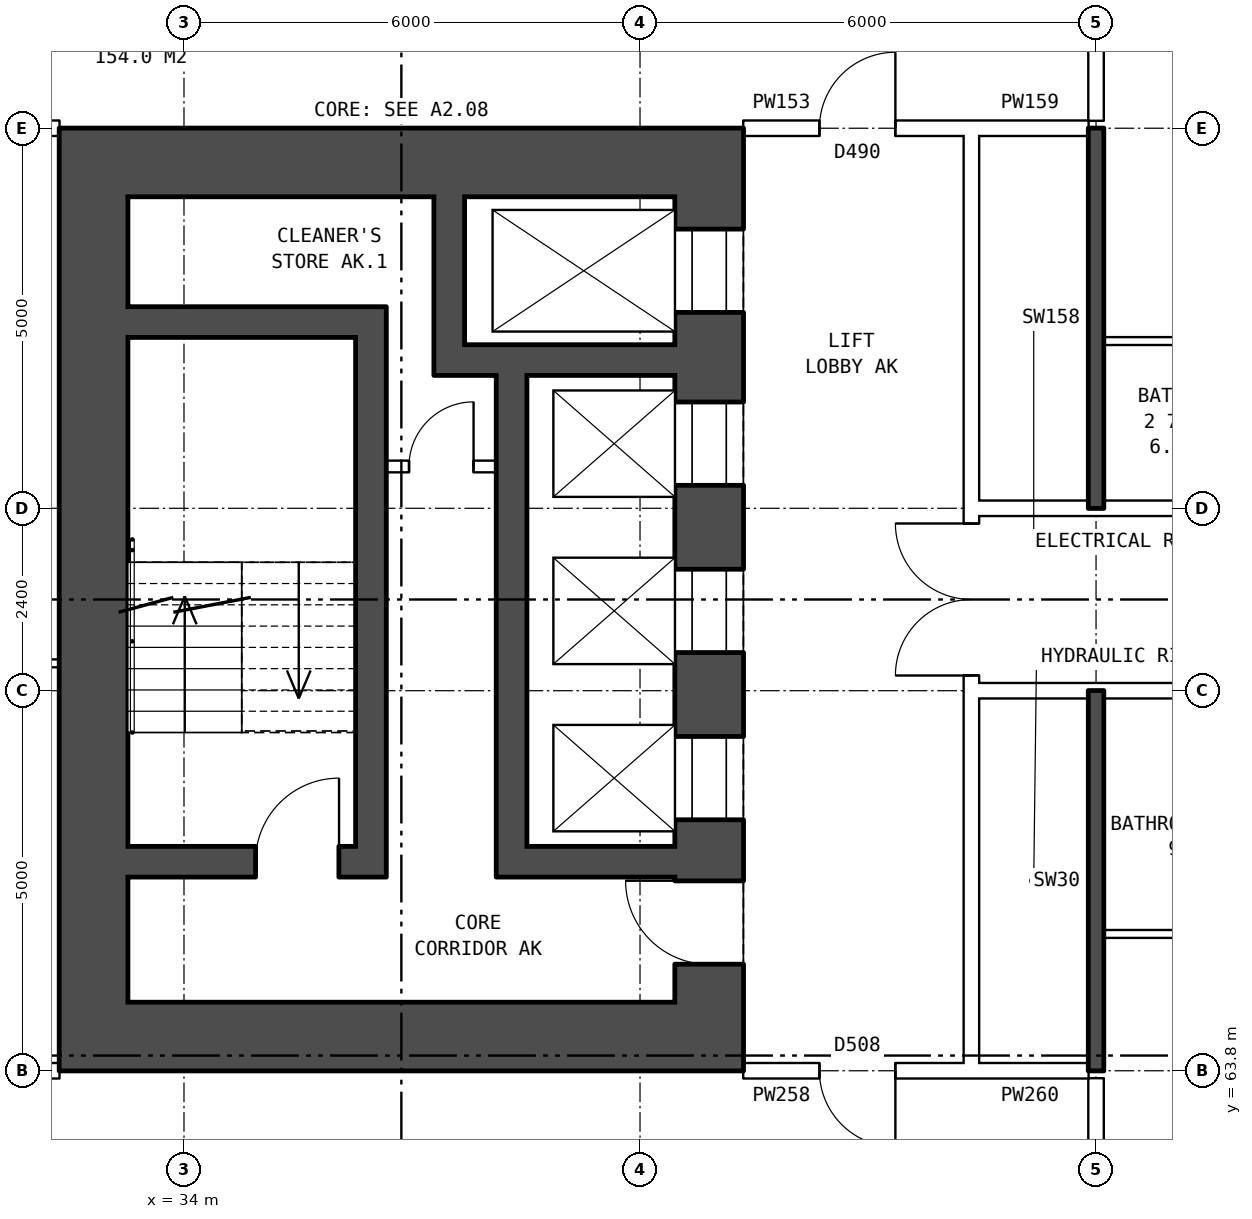
"""IFC4 building model, lengths in metres.
Left out: names, types, materials, properties, quantities, classifications, styles, units other than length and angle.
Written with IfcOpenShell. Run it as: python <this file> out.ifc"""

import sys

from ifc_helpers import new_model, si_unit, direction, frame, frame_2d, origin, place, context, subcontext, project, spatial, rectangle, extrude, element, fill, save


model = new_model("IFC4")
c1 = context("Model", 3, precision=1e-05, world=origin(), true_north=direction((0.0, 1.0)))
c2 = subcontext(c1, "Body", "Model", "MODEL_VIEW")
j1 = project(units=[si_unit("LENGTHUNIT", "METRE"), si_unit("PLANEANGLEUNIT", "RADIAN")], contexts=[c1])
p1 = place(None, origin())
s1 = spatial("IfcSite", under=j1, at=p1, CompositionType="ELEMENT")
p2 = place(p1, origin())
s2 = spatial("IfcBuilding", under=s1, at=p2, CompositionType="ELEMENT")
p3 = place(p2, frame((0.0, 0.0, 28.8)))
s3 = spatial("IfcBuildingStorey", under=s2, at=p3, CompositionType="ELEMENT", Elevation=28.8)
p4 = place(p3, frame((40.91, 75.3, 0.0), z_axis=(0.0, 0.0, 1.0), x_axis=(0.0, -1.0, 0.0)))
e1 = element("IfcWall", 1, at=p4, inside=s3, PredefinedType="SHEAR", context=c2, shape_type="SweptSolid", body=[
    extrude(rectangle(XDim=10.6, YDim=0.9, at=frame_2d((5.3, 0.0))), origin(), (0.0, 0.0, 1.0), 2.85),
])
p5 = place(p4, frame((0.425, 0.0, 0.0)))
e2 = element("IfcOpeningElement", 2, at=p5, cuts=e1, PredefinedType="OPENING", context=c2, shape_type="SweptSolid", body=[
    extrude(rectangle(XDim=1.1, YDim=2.1, at=frame_2d((0.55, 1.05))), frame((0.0, 0.46, 0.0), z_axis=(0.0, -1.0, 0.0), x_axis=(1.0, 0.0, 0.0)), (0.0, 0.0, 1.0), 0.92),
])
p6 = place(p4, frame((2.7, 0.0, 0.0)))
e3 = element("IfcOpeningElement", 3, at=p6, cuts=e1, PredefinedType="OPENING", context=c2, shape_type="SweptSolid", body=[
    extrude(rectangle(XDim=1.1, YDim=2.1, at=frame_2d((0.55, 1.05))), frame((0.0, 0.46, 0.0), z_axis=(0.0, -1.0, 0.0), x_axis=(1.0, 0.0, 0.0)), (0.0, 0.0, 1.0), 0.92),
])
p7 = place(p4, frame((4.9, 0.0, 0.0)))
e4 = element("IfcOpeningElement", 4, at=p7, cuts=e1, PredefinedType="OPENING", context=c2, shape_type="SweptSolid", body=[
    extrude(rectangle(XDim=1.1, YDim=2.1, at=frame_2d((0.55, 1.05))), frame((0.0, 0.46, 0.0), z_axis=(0.0, -1.0, 0.0), x_axis=(1.0, 0.0, 0.0)), (0.0, 0.0, 1.0), 0.92),
])
p8 = place(p4, frame((7.1, 0.0, 0.0)))
e5 = element("IfcOpeningElement", 5, at=p8, cuts=e1, PredefinedType="OPENING", context=c2, shape_type="SweptSolid", body=[
    extrude(rectangle(XDim=1.1, YDim=2.1, at=frame_2d((0.55, 1.05))), frame((0.0, 0.46, 0.0), z_axis=(0.0, -1.0, 0.0), x_axis=(1.0, 0.0, 0.0)), (0.0, 0.0, 1.0), 0.92),
])
p9 = place(p4, frame((9.0, 0.0, 0.0)))
e6 = element("IfcOpeningElement", 6, at=p9, cuts=e1, PredefinedType="OPENING", context=c2, shape_type="SweptSolid", body=[
    extrude(rectangle(XDim=1.1, YDim=2.1, at=frame_2d((0.55, 1.05))), frame((0.0, 0.46, 0.0), z_axis=(0.0, -1.0, 0.0), x_axis=(1.0, 0.0, 0.0)), (0.0, 0.0, 1.0), 0.92),
])
p10 = place(p3, frame((32.81, 75.3, 0.0), z_axis=(0.0, 0.0, 1.0), x_axis=(0.0, -1.0, 0.0)))
e7 = element("IfcWall", 7, at=p10, inside=s3, PredefinedType="SHEAR", context=c2, shape_type="SweptSolid", body=[
    extrude(rectangle(XDim=10.6, YDim=0.9, at=frame_2d((5.3, 0.0))), origin(), (0.0, 0.0, 1.0), 2.85),
])
for number, where, z_axis, x_axis in (
    (8, (41.36, 75.75, 0.0), (0.0, 0.0, 1.0), (-1.0, 0.0, 0.0)),
    (9, (41.36, 64.25, 0.0), (0.0, 0.0, 1.0), (-1.0, 0.0, 0.0)),
):
    element("IfcWall", number, at=place(p3, frame(where, z_axis=z_axis, x_axis=x_axis)), inside=s3, PredefinedType="SHEAR", context=c2, shape_type="SweptSolid", body=[
        extrude(rectangle(XDim=9.0, YDim=0.9, at=frame_2d((4.5, 0.0))), origin(), (0.0, 0.0, 1.0), 2.85),
    ])
p11 = place(p3, frame((36.26, 73.65, 0.0), z_axis=(0.0, 0.0, 1.0), x_axis=(-1.0, 0.0, 0.0)))
e10 = element("IfcWall", 10, at=p11, inside=s3, PredefinedType="SHEAR", context=c2, shape_type="SweptSolid", body=[
    extrude(rectangle(XDim=3.0, YDim=0.4, at=frame_2d((1.5, 0.0))), origin(), (0.0, 0.0, 1.0), 2.85),
])
p12 = place(p3, frame((40.46, 73.15, 0.0), z_axis=(0.0, 0.0, 1.0), x_axis=(-1.0, 0.0, 0.0)))
e11 = element("IfcWall", 11, at=p12, inside=s3, PredefinedType="SHEAR", context=c2, shape_type="SweptSolid", body=[
    extrude(rectangle(XDim=3.17, YDim=0.4, at=frame_2d((1.585, 0.0))), origin(), (0.0, 0.0, 1.0), 2.85),
])
p13 = place(p3, frame((38.11, 71.75, 0.0), z_axis=(0.0, 0.0, 1.0), x_axis=(-1.0, 0.0, 0.0)))
e12 = element("IfcWall", 12, at=p13, inside=s3, PredefinedType="PARTITIONING", context=c2, shape_type="SweptSolid", body=[
    extrude(rectangle(XDim=1.45, YDim=0.15, at=frame_2d((0.725, 0.0))), origin(), (0.0, 0.0, 1.0), 2.85),
])
p14 = place(p13, frame((0.3, 0.0, 0.0)))
e13 = element("IfcOpeningElement", 13, at=p14, cuts=e12, PredefinedType="OPENING", context=c2, shape_type="SweptSolid", body=[
    extrude(rectangle(XDim=0.85, YDim=2.1, at=frame_2d((0.425, 1.05))), frame((0.0, 0.085, 0.0), z_axis=(0.0, -1.0, 0.0), x_axis=(1.0, 0.0, 0.0)), (0.0, 0.0, 1.0), 0.17),
])
p15 = place(p3, frame((40.46, 66.55, 0.0), z_axis=(0.0, 0.0, 1.0), x_axis=(-1.0, 0.0, 0.0)))
e14 = element("IfcWall", 14, at=p15, inside=s3, PredefinedType="SHEAR", context=c2, shape_type="SweptSolid", body=[
    extrude(rectangle(XDim=1.95, YDim=0.4, at=frame_2d((0.975, 0.0))), origin(), (0.0, 0.0, 1.0), 2.85),
])
p16 = place(p3, frame((36.26, 66.55, 0.0), z_axis=(0.0, 0.0, 1.0), x_axis=(-1.0, 0.0, 0.0)))
e15 = element("IfcWall", 15, at=p16, inside=s3, PredefinedType="SHEAR", context=c2, shape_type="SweptSolid", body=[
    extrude(rectangle(XDim=3.0, YDim=0.4, at=frame_2d((1.5, 0.0))), origin(), (0.0, 0.0, 1.0), 2.85),
])
p17 = place(p16, frame((0.22, 0.0, 0.0)))
e16 = element("IfcOpeningElement", 16, at=p17, cuts=e15, PredefinedType="OPENING", context=c2, shape_type="SweptSolid", body=[
    extrude(rectangle(XDim=1.1, YDim=2.1, at=frame_2d((0.55, 1.05))), frame((0.0, 0.21, 0.0), z_axis=(0.0, -1.0, 0.0), x_axis=(1.0, 0.0, 0.0)), (0.0, 0.0, 1.0), 0.42),
])
p18 = place(p3, frame((38.31, 72.95, 0.0), z_axis=(0.0, 0.0, 1.0), x_axis=(0.0, -1.0, 0.0)))
e17 = element("IfcWall", 17, at=p18, inside=s3, PredefinedType="SHEAR", context=c2, shape_type="SweptSolid", body=[
    extrude(rectangle(XDim=6.6, YDim=0.4, at=frame_2d((3.3, 0.0))), origin(), (0.0, 0.0, 1.0), 2.85),
])
p19 = place(p3, frame((37.49, 75.3, 0.0), z_axis=(0.0, 0.0, 1.0), x_axis=(0.0, -1.0, 0.0)))
e18 = element("IfcWall", 18, at=p19, inside=s3, PredefinedType="SHEAR", context=c2, shape_type="SweptSolid", body=[
    extrude(rectangle(XDim=1.95, YDim=0.4, at=frame_2d((0.975, 0.0))), origin(), (0.0, 0.0, 1.0), 2.85),
])
p20 = place(p3, frame((36.46, 73.85, 0.0), z_axis=(0.0, 0.0, 1.0), x_axis=(0.0, -1.0, 0.0)))
e19 = element("IfcWall", 19, at=p20, inside=s3, PredefinedType="SHEAR", context=c2, shape_type="SweptSolid", body=[
    extrude(rectangle(XDim=7.5, YDim=0.4, at=frame_2d((3.75, 0.0))), origin(), (0.0, 0.0, 1.0), 2.85),
])
p21 = place(p3, frame((44.36, 63.9, 0.0), z_axis=(0.0, 0.0, 1.0), x_axis=(0.0, 1.0, 0.0)))
e20 = element("IfcWall", 20, at=p21, inside=s3, PredefinedType="PARTITIONING", context=c2, shape_type="SweptSolid", body=[
    extrude(rectangle(XDim=12.2, YDim=0.2, at=frame_2d((6.1, 0.0))), origin(), (0.0, 0.0, 1.0), 2.85),
])
p22 = place(p21, frame((5.1, 0.0, 0.0)))
e21 = element("IfcOpeningElement", 21, at=p22, cuts=e20, PredefinedType="OPENING", context=c2, shape_type="SweptSolid", body=[
    extrude(rectangle(XDim=2.0, YDim=2.1, at=frame_2d((1.0, 1.05))), frame((0.0, 0.11, 0.0), z_axis=(0.0, -1.0, 0.0), x_axis=(1.0, 0.0, 0.0)), (0.0, 0.0, 1.0), 0.22),
])
p23 = place(p3, frame((22.51, 63.8, 0.0), z_axis=(0.0, 0.0, 1.0), x_axis=(1.0, 0.0, 0.0)))
e22 = element("IfcWall", 22, at=p23, inside=s3, PredefinedType="PARTITIONING", context=c2, shape_type="SweptSolid", body=[
    extrude(rectangle(XDim=9.85, YDim=0.2, at=frame_2d((4.925, 0.0))), origin(), (0.0, 0.0, 1.0), 2.85),
])
p24 = place(p23, frame((7.27, 0.0, 0.0)))
e23 = element("IfcOpeningElement", 23, at=p24, cuts=e22, PredefinedType="OPENING", context=c2, shape_type="SweptSolid", body=[
    extrude(rectangle(XDim=0.8, YDim=2.1, at=frame_2d((0.4, 1.05))), frame((0.0, 0.11, 0.0), z_axis=(0.0, -1.0, 0.0), x_axis=(1.0, 0.0, 0.0)), (0.0, 0.0, 1.0), 0.22),
])
p25 = place(p3, frame((41.36, 63.8, 0.0), z_axis=(0.0, 0.0, 1.0), x_axis=(1.0, 0.0, 0.0)))
e24 = element("IfcWall", 24, at=p25, inside=s3, PredefinedType="PARTITIONING", context=c2, shape_type="SweptSolid", body=[
    extrude(rectangle(XDim=3.0, YDim=0.2, at=frame_2d((1.5, 0.0))), origin(), (0.0, 0.0, 1.0), 2.85),
])
p26 = place(p25, frame((1.0, 0.0, 0.0)))
e25 = element("IfcOpeningElement", 25, at=p26, cuts=e24, PredefinedType="OPENING", context=c2, shape_type="SweptSolid", body=[
    extrude(rectangle(XDim=1.0, YDim=2.1, at=frame_2d((0.5, 1.05))), frame((0.0, 0.11, 0.0), z_axis=(0.0, -1.0, 0.0), x_axis=(1.0, 0.0, 0.0)), (0.0, 0.0, 1.0), 0.22),
])
p27 = place(p3, frame((44.36, 63.8, 0.0), z_axis=(0.0, 0.0, 1.0), x_axis=(1.0, 0.0, 0.0)))
e26 = element("IfcWall", 26, at=p27, inside=s3, PredefinedType="PARTITIONING", context=c2, shape_type="SweptSolid", body=[
    extrude(rectangle(XDim=1.54, YDim=0.2, at=frame_2d((0.77, 0.0))), origin(), (0.0, 0.0, 1.0), 2.85),
])
p28 = place(p3, frame((46.1, 65.6, 0.0), z_axis=(0.0, 0.0, 1.0), x_axis=(1.0, 0.0, 0.0)))
e27 = element("IfcWall", 27, at=p28, inside=s3, PredefinedType="PARTITIONING", context=c2, shape_type="SweptSolid", body=[
    extrude(rectangle(XDim=2.9, YDim=0.1, at=frame_2d((1.45, 0.0))), origin(), (0.0, 0.0, 1.0), 2.85),
])
p29 = place(p3, frame((44.36, 68.8, 0.0), z_axis=(0.0, 0.0, 1.0), x_axis=(1.0, 0.0, 0.0)))
e28 = element("IfcWall", 28, at=p29, inside=s3, PredefinedType="PARTITIONING", context=c2, shape_type="SweptSolid", body=[
    extrude(rectangle(XDim=19.28, YDim=0.2, at=frame_2d((9.64, 0.0))), origin(), (0.0, 0.0, 1.0), 2.85),
])
p30 = place(p29, frame((14.64, 0.0, 0.0)))
e29 = element("IfcOpeningElement", 29, at=p30, cuts=e28, PredefinedType="OPENING", context=c2, shape_type="SweptSolid", body=[
    extrude(rectangle(XDim=1.0, YDim=2.1, at=frame_2d((0.5, 1.05))), frame((0.0, 0.11, 0.0), z_axis=(0.0, -1.0, 0.0), x_axis=(1.0, 0.0, 0.0)), (0.0, 0.0, 1.0), 0.22),
])
p31 = place(p29, frame((5.64, 0.0, 0.0)))
e30 = element("IfcOpeningElement", 30, at=p31, cuts=e28, PredefinedType="OPENING", context=c2, shape_type="SweptSolid", body=[
    extrude(rectangle(XDim=1.0, YDim=2.1, at=frame_2d((0.5, 1.05))), frame((0.0, 0.11, 0.0), z_axis=(0.0, -1.0, 0.0), x_axis=(1.0, 0.0, 0.0)), (0.0, 0.0, 1.0), 0.22),
])
p32 = place(p3, frame((28.1, 69.16, 0.0), z_axis=(0.0, 0.0, 1.0), x_axis=(1.0, 0.0, 0.0)))
e31 = element("IfcWall", 31, at=p32, inside=s3, PredefinedType="PARTITIONING", context=c2, shape_type="SweptSolid", body=[
    extrude(rectangle(XDim=4.26, YDim=0.1, at=frame_2d((2.13, 0.0))), origin(), (0.0, 0.0, 1.0), 2.85),
])
p33 = place(p3, frame((44.36, 71.2, 0.0), z_axis=(0.0, 0.0, 1.0), x_axis=(1.0, 0.0, 0.0)))
e32 = element("IfcWall", 32, at=p33, inside=s3, PredefinedType="PARTITIONING", context=c2, shape_type="SweptSolid", body=[
    extrude(rectangle(XDim=19.28, YDim=0.2, at=frame_2d((9.64, 0.0))), origin(), (0.0, 0.0, 1.0), 2.85),
])
p34 = place(p33, frame((14.64, 0.0, 0.0)))
e33 = element("IfcOpeningElement", 33, at=p34, cuts=e32, PredefinedType="OPENING", context=c2, shape_type="SweptSolid", body=[
    extrude(rectangle(XDim=1.0, YDim=2.1, at=frame_2d((0.5, 1.05))), frame((0.0, 0.11, 0.0), z_axis=(0.0, -1.0, 0.0), x_axis=(1.0, 0.0, 0.0)), (0.0, 0.0, 1.0), 0.22),
])
p35 = place(p33, frame((5.64, 0.0, 0.0)))
e34 = element("IfcOpeningElement", 34, at=p35, cuts=e32, PredefinedType="OPENING", context=c2, shape_type="SweptSolid", body=[
    extrude(rectangle(XDim=1.0, YDim=2.1, at=frame_2d((0.5, 1.05))), frame((0.0, 0.11, 0.0), z_axis=(0.0, -1.0, 0.0), x_axis=(1.0, 0.0, 0.0)), (0.0, 0.0, 1.0), 0.22),
])
p36 = place(p3, frame((46.1, 73.4, 0.0), z_axis=(0.0, 0.0, 1.0), x_axis=(1.0, 0.0, 0.0)))
e35 = element("IfcWall", 35, at=p36, inside=s3, PredefinedType="PARTITIONING", context=c2, shape_type="SweptSolid", body=[
    extrude(rectangle(XDim=2.9, YDim=0.1, at=frame_2d((1.45, 0.0))), origin(), (0.0, 0.0, 1.0), 2.85),
])
p37 = place(p3, frame((22.51, 76.2, 0.0), z_axis=(0.0, 0.0, 1.0), x_axis=(1.0, 0.0, 0.0)))
e36 = element("IfcWall", 36, at=p37, inside=s3, PredefinedType="PARTITIONING", context=c2, shape_type="SweptSolid", body=[
    extrude(rectangle(XDim=9.85, YDim=0.2, at=frame_2d((4.925, 0.0))), origin(), (0.0, 0.0, 1.0), 2.85),
])
p38 = place(p37, frame((7.27, 0.0, 0.0)))
e37 = element("IfcOpeningElement", 37, at=p38, cuts=e36, PredefinedType="OPENING", context=c2, shape_type="SweptSolid", body=[
    extrude(rectangle(XDim=0.8, YDim=2.1, at=frame_2d((0.4, 1.05))), frame((0.0, 0.11, 0.0), z_axis=(0.0, -1.0, 0.0), x_axis=(1.0, 0.0, 0.0)), (0.0, 0.0, 1.0), 0.22),
])
p39 = place(p3, frame((41.36, 76.2, 0.0), z_axis=(0.0, 0.0, 1.0), x_axis=(1.0, 0.0, 0.0)))
e38 = element("IfcWall", 38, at=p39, inside=s3, PredefinedType="PARTITIONING", context=c2, shape_type="SweptSolid", body=[
    extrude(rectangle(XDim=3.0, YDim=0.2, at=frame_2d((1.5, 0.0))), origin(), (0.0, 0.0, 1.0), 2.85),
])
p40 = place(p39, frame((1.0, 0.0, 0.0)))
e39 = element("IfcOpeningElement", 39, at=p40, cuts=e38, PredefinedType="OPENING", context=c2, shape_type="SweptSolid", body=[
    extrude(rectangle(XDim=1.0, YDim=2.1, at=frame_2d((0.5, 1.05))), frame((0.0, 0.11, 0.0), z_axis=(0.0, -1.0, 0.0), x_axis=(1.0, 0.0, 0.0)), (0.0, 0.0, 1.0), 0.22),
])
p41 = place(p3, frame((44.36, 76.2, 0.0), z_axis=(0.0, 0.0, 1.0), x_axis=(1.0, 0.0, 0.0)))
e40 = element("IfcWall", 40, at=p41, inside=s3, PredefinedType="PARTITIONING", context=c2, shape_type="SweptSolid", body=[
    extrude(rectangle(XDim=1.54, YDim=0.2, at=frame_2d((0.77, 0.0))), origin(), (0.0, 0.0, 1.0), 2.85),
])
p42 = place(p3, frame((46.0, 61.5, 0.0), z_axis=(0.0, 0.0, 1.0), x_axis=(0.0, 1.0, 0.0)))
e41 = element("IfcWall", 41, at=p42, inside=s3, PredefinedType="PARTITIONING", context=c2, shape_type="SweptSolid", body=[
    extrude(rectangle(XDim=2.2, YDim=0.2, at=frame_2d((1.1, 0.0))), origin(), (0.0, 0.0, 1.0), 2.85),
])
for number, where, z_axis, x_axis in (
    (42, (46.0, 63.8, 0.0), (0.0, 0.0, 1.0), (0.0, 1.0, 0.0)),
    (43, (46.0, 71.2, 0.0), (0.0, 0.0, 1.0), (0.0, 1.0, 0.0)),
):
    element("IfcWall", number, at=place(p3, frame(where, z_axis=z_axis, x_axis=x_axis)), inside=s3, PredefinedType="SOLIDWALL", context=c2, shape_type="SweptSolid", body=[
        extrude(rectangle(XDim=5.0, YDim=0.2, at=frame_2d((2.5, 0.0))), origin(), (0.0, 0.0, 1.0), 2.85),
    ])
p43 = place(p3, frame((46.0, 76.3, 0.0), z_axis=(0.0, 0.0, 1.0), x_axis=(0.0, 1.0, 0.0)))
e44 = element("IfcWall", 44, at=p43, inside=s3, PredefinedType="PARTITIONING", context=c2, shape_type="SweptSolid", body=[
    extrude(rectangle(XDim=2.2, YDim=0.2, at=frame_2d((1.1, 0.0))), origin(), (0.0, 0.0, 1.0), 2.85),
])
p44 = place(p5, origin())
e45 = element("IfcDoor", 45, at=p44, inside=s3, OperationType="DOUBLE_DOOR_SLIDING", PredefinedType="DOOR", context=c2, shape_type="SweptSolid", body=[
    extrude(rectangle(XDim=1.1, YDim=2.1, at=frame_2d((0.55, 1.05))), frame((0.0, -0.385, 0.0), z_axis=(0.0, -1.0, 0.0), x_axis=(1.0, 0.0, 0.0)), (0.0, 0.0, 1.0), 0.05),
])
fill(e2, e45)
p45 = place(p6, origin())
e46 = element("IfcDoor", 46, at=p45, inside=s3, OperationType="DOUBLE_DOOR_SLIDING", PredefinedType="DOOR", context=c2, shape_type="SweptSolid", body=[
    extrude(rectangle(XDim=1.1, YDim=2.1, at=frame_2d((0.55, 1.05))), frame((0.0, -0.385, 0.0), z_axis=(0.0, -1.0, 0.0), x_axis=(1.0, 0.0, 0.0)), (0.0, 0.0, 1.0), 0.05),
])
fill(e3, e46)
p46 = place(p7, origin())
e47 = element("IfcDoor", 47, at=p46, inside=s3, OperationType="DOUBLE_DOOR_SLIDING", PredefinedType="DOOR", context=c2, shape_type="SweptSolid", body=[
    extrude(rectangle(XDim=1.1, YDim=2.1, at=frame_2d((0.55, 1.05))), frame((0.0, -0.385, 0.0), z_axis=(0.0, -1.0, 0.0), x_axis=(1.0, 0.0, 0.0)), (0.0, 0.0, 1.0), 0.05),
])
fill(e4, e47)
p47 = place(p8, origin())
e48 = element("IfcDoor", 48, at=p47, inside=s3, OperationType="DOUBLE_DOOR_SLIDING", PredefinedType="DOOR", context=c2, shape_type="SweptSolid", body=[
    extrude(rectangle(XDim=1.1, YDim=2.1, at=frame_2d((0.55, 1.05))), frame((0.0, -0.385, 0.0), z_axis=(0.0, -1.0, 0.0), x_axis=(1.0, 0.0, 0.0)), (0.0, 0.0, 1.0), 0.05),
])
fill(e5, e48)
p48 = place(p9, frame((1.1, 0.0, 0.0), z_axis=(0.0, 0.0, 1.0), x_axis=(-1.0, 0.0, 0.0)))
e49 = element("IfcDoor", 49, at=p48, inside=s3, OperationType="SINGLE_SWING_RIGHT", PredefinedType="DOOR", context=c2, shape_type="SweptSolid", body=[
    extrude(rectangle(XDim=1.1, YDim=2.1, at=frame_2d((0.55, 1.05))), frame((0.0, 0.435, 0.0), z_axis=(0.0, -1.0, 0.0), x_axis=(1.0, 0.0, 0.0)), (0.0, 0.0, 1.0), 0.05),
])
fill(e6, e49)
p49 = place(p17, frame((1.1, 0.0, 0.0), z_axis=(0.0, 0.0, 1.0), x_axis=(-1.0, 0.0, 0.0)))
e50 = element("IfcDoor", 50, at=p49, inside=s3, OperationType="SINGLE_SWING_RIGHT", PredefinedType="DOOR", context=c2, shape_type="SweptSolid", body=[
    extrude(rectangle(XDim=1.1, YDim=2.1, at=frame_2d((0.55, 1.05))), frame((0.0, 0.025, 0.0), z_axis=(0.0, -1.0, 0.0), x_axis=(1.0, 0.0, 0.0)), (0.0, 0.0, 1.0), 0.05),
])
fill(e16, e50)
p50 = place(p14, frame((0.85, 0.0, 0.0), z_axis=(0.0, 0.0, 1.0), x_axis=(-1.0, 0.0, 0.0)))
e51 = element("IfcDoor", 51, at=p50, inside=s3, OperationType="SINGLE_SWING_RIGHT", PredefinedType="DOOR", context=c2, shape_type="SweptSolid", body=[
    extrude(rectangle(XDim=0.85, YDim=2.1, at=frame_2d((0.425, 1.05))), frame((0.0, 0.025, 0.0), z_axis=(0.0, -1.0, 0.0), x_axis=(1.0, 0.0, 0.0)), (0.0, 0.0, 1.0), 0.05),
])
fill(e13, e51)
p51 = place(p22, origin())
e52 = element("IfcDoor", 52, at=p51, inside=s3, OperationType="DOUBLE_DOOR_SINGLE_SWING", PredefinedType="DOOR", context=c2, shape_type="SweptSolid", body=[
    extrude(rectangle(XDim=2.0, YDim=2.1, at=frame_2d((1.0, 1.05))), frame((0.0, 0.025, 0.0), z_axis=(0.0, -1.0, 0.0), x_axis=(1.0, 0.0, 0.0)), (0.0, 0.0, 1.0), 0.05),
])
fill(e21, e52)
p52 = place(p26, frame((1.0, 0.0, 0.0), z_axis=(0.0, 0.0, 1.0), x_axis=(-1.0, 0.0, 0.0)))
e53 = element("IfcDoor", 53, at=p52, inside=s3, OperationType="SINGLE_SWING_LEFT", PredefinedType="DOOR", context=c2, shape_type="SweptSolid", body=[
    extrude(rectangle(XDim=1.0, YDim=2.1, at=frame_2d((0.5, 1.05))), frame((0.0, 0.025, 0.0), z_axis=(0.0, -1.0, 0.0), x_axis=(1.0, 0.0, 0.0)), (0.0, 0.0, 1.0), 0.05),
])
fill(e25, e53)
p53 = place(p40, origin())
e54 = element("IfcDoor", 54, at=p53, inside=s3, OperationType="SINGLE_SWING_RIGHT", PredefinedType="DOOR", context=c2, shape_type="SweptSolid", body=[
    extrude(rectangle(XDim=1.0, YDim=2.1, at=frame_2d((0.5, 1.05))), frame((0.0, 0.025, 0.0), z_axis=(0.0, -1.0, 0.0), x_axis=(1.0, 0.0, 0.0)), (0.0, 0.0, 1.0), 0.05),
])
fill(e39, e54)
save(model, sys.argv[1])
